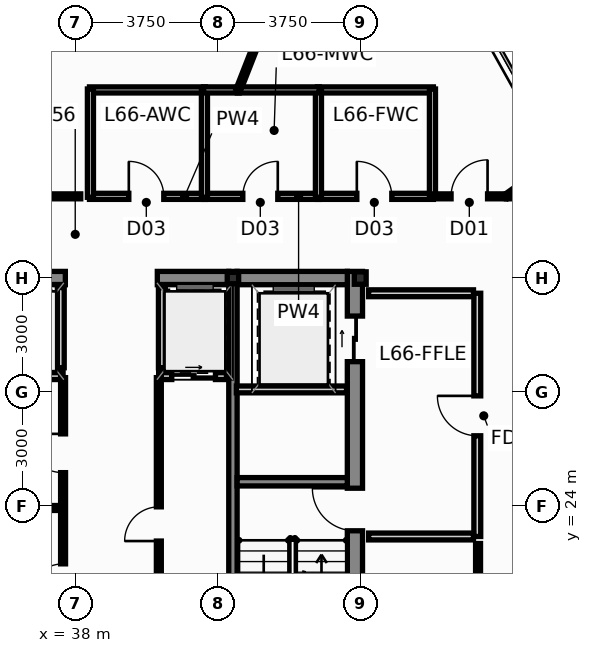
"""IFC4 building model, lengths in metres.
Left out: names, types, materials, properties, quantities, classifications, styles, units other than length and angle.
Written with IfcOpenShell. Run it as: python <this file> out.ifc"""

import sys

from ifc_helpers import new_model, si_unit, direction, frame, frame_2d, origin, origin_2d, place, context, subcontext, project, spatial, rectangle, hollow_rectangle, i_section, extrude, source, transform, mapped, element, fill, save


model = new_model("IFC4")
c1 = context("Model", 3, precision=1e-05, world=origin(), true_north=direction((0.0, 1.0)))
c2 = subcontext(c1, "Body", "Model", "MODEL_VIEW")
j1 = project(units=[si_unit("LENGTHUNIT", "METRE"), si_unit("PLANEANGLEUNIT", "RADIAN")], contexts=[c1])
p1 = place(None, origin())
s1 = spatial("IfcSite", under=j1, at=p1, CompositionType="ELEMENT")
p2 = place(p1, origin())
s2 = spatial("IfcBuilding", under=s1, at=p2, CompositionType="ELEMENT")
p3 = place(p2, frame((0.0, 0.0, 251.75)))
s3 = spatial("IfcBuildingStorey", under=s2, at=p3, CompositionType="ELEMENT", Elevation=251.75)
m1 = source(origin(), c2, "Body", "SweptSolid", [
    extrude(i_section(OverallWidth=0.311, OverallDepth=0.327, WebThickness=0.016, FlangeThickness=0.025, at=origin_2d()), origin(), (0.0, 0.0, 1.0), 3.65),
])
p4 = place(p3, frame((45.5, 30.0, 0.0), z_axis=(0.0, 0.0, 1.0), x_axis=(1.0, 0.0, 0.0)))
e1 = element("IfcColumn", 1, at=p4, inside=s3, PredefinedType="COLUMN", context=c2, shape_type="MappedRepresentation", body=[
    mapped(m1, transform((0.0, 0.0, 0.0), scale=1.0)),
])
m2 = source(origin(), c2, "Body", "SweptSolid", [
    extrude(hollow_rectangle(XDim=0.3, YDim=0.3, WallThickness=0.012, at=origin_2d()), origin(), (0.0, 0.0, 1.0), 3.65),
])
p5 = place(p3, frame((42.15, 30.0, 0.0), z_axis=(0.0, 0.0, 1.0), x_axis=(1.0, 0.0, 0.0)))
e2 = element("IfcColumn", 2, at=p5, inside=s3, PredefinedType="COLUMN", context=c2, shape_type="MappedRepresentation", body=[
    mapped(m2, transform((0.0, 0.0, 0.0), scale=1.0)),
])
p6 = place(p3, frame((45.36, 17.05, 0.0), z_axis=(0.0, 0.0, 1.0), x_axis=(0.0, 1.0, 0.0)))
e3 = element("IfcWall", 3, at=p6, inside=s3, PredefinedType="SHEAR", context=c2, shape_type="SweptSolid", body=[
    extrude(rectangle(XDim=13.125, YDim=0.4, at=frame_2d((6.562, 0.0))), origin(), (0.0, 0.0, 1.0), 3.65),
])
p7 = place(p6, frame((6.3, 0.0, 0.0)))
e4 = element("IfcOpeningElement", 4, at=p7, cuts=e3, PredefinedType="OPENING", context=c2, shape_type="SweptSolid", body=[
    extrude(rectangle(XDim=1.12, YDim=2.15, at=frame_2d((0.56, 1.075))), frame((0.0, 0.212, 0.0), z_axis=(0.0, -1.0, 0.0), x_axis=(1.0, 0.0, 0.0)), (0.0, 0.0, 1.0), 0.424),
])
p8 = place(p6, frame((10.75, 0.0, 0.0)))
e5 = element("IfcOpeningElement", 5, at=p8, cuts=e3, PredefinedType="OPENING", context=c2, shape_type="SweptSolid", body=[
    extrude(rectangle(XDim=1.2, YDim=2.2, at=frame_2d((0.6, 1.1))), frame((0.0, 0.212, 0.0), z_axis=(0.0, -1.0, 0.0), x_axis=(1.0, 0.0, 0.0)), (0.0, 0.0, 1.0), 0.424),
])
p9 = place(p3, frame((33.96, 30.0, 0.0), z_axis=(0.0, 0.0, 1.0), x_axis=(1.0, 0.0, 0.0)))
e6 = element("IfcWall", 6, at=p9, inside=s3, PredefinedType="SHEAR", context=c2, shape_type="SweptSolid", body=[
    extrude(rectangle(XDim=3.78, YDim=0.35, at=frame_2d((1.89, 0.0))), origin(), (0.0, 0.0, 1.0), 3.65),
])
p10 = place(p3, frame((40.16, 30.0, 0.0), z_axis=(0.0, 0.0, 1.0), x_axis=(1.0, 0.0, 0.0)))
e7 = element("IfcWall", 7, at=p10, inside=s3, PredefinedType="SHEAR", context=c2, shape_type="SweptSolid", body=[
    extrude(rectangle(XDim=1.88, YDim=0.35, at=frame_2d((0.94, 0.0))), origin(), (0.0, 0.0, 1.0), 3.65),
])
p11 = place(p3, frame((42.26, 30.0, 0.0), z_axis=(0.0, 0.0, 1.0), x_axis=(1.0, 0.0, 0.0)))
e8 = element("IfcWall", 8, at=p11, inside=s3, PredefinedType="SHEAR", context=c2, shape_type="SweptSolid", body=[
    extrude(rectangle(XDim=2.9, YDim=0.35, at=frame_2d((1.45, 0.0))), origin(), (0.0, 0.0, 1.0), 3.65),
])
p12 = place(p3, frame((42.15, 17.05, 0.0), z_axis=(0.0, 0.0, 1.0), x_axis=(0.0, 1.0, 0.0)))
e9 = element("IfcWall", 9, at=p12, inside=s3, PredefinedType="SHEAR", context=c2, shape_type="SweptSolid", body=[
    extrude(rectangle(XDim=13.125, YDim=0.22, at=frame_2d((6.562, 0.0))), origin(), (0.0, 0.0, 1.0), 3.65),
])
p13 = place(p3, frame((42.26, 24.64, 0.0), z_axis=(0.0, 0.0, 1.0), x_axis=(1.0, 0.0, 0.0)))
e10 = element("IfcWall", 10, at=p13, inside=s3, PredefinedType="SHEAR", context=c2, shape_type="SweptSolid", body=[
    extrude(rectangle(XDim=2.9, YDim=0.22, at=frame_2d((1.45, 0.0))), origin(), (0.0, 0.0, 1.0), 3.65),
])
p14 = place(p3, frame((34.02, 27.42, 0.0), z_axis=(0.0, 0.0, 1.0), x_axis=(1.0, 0.0, 0.0)))
e11 = element("IfcWall", 11, at=p14, inside=s3, PredefinedType="PARTITIONING", context=c2, shape_type="SweptSolid", body=[
    extrude(rectangle(XDim=3.66, YDim=0.18, at=frame_2d((1.83, 0.0))), origin(), (0.0, 0.0, 1.0), 3.4),
])
p15 = place(p14, frame((0.3, 0.0, 0.0)))
e12 = element("IfcOpeningElement", 12, at=p15, cuts=e11, PredefinedType="OPENING", context=c2, shape_type="SweptSolid", body=[
    extrude(rectangle(XDim=1.15, YDim=2.2, at=frame_2d((0.575, 1.1))), frame((0.0, 0.102, 0.0), z_axis=(0.0, -1.0, 0.0), x_axis=(1.0, 0.0, 0.0)), (0.0, 0.0, 1.0), 0.204),
])
p16 = place(p14, frame((2.1, 0.0, 0.0)))
e13 = element("IfcOpeningElement", 13, at=p16, cuts=e11, PredefinedType="OPENING", context=c2, shape_type="SweptSolid", body=[
    extrude(rectangle(XDim=1.15, YDim=2.2, at=frame_2d((0.575, 1.1))), frame((0.0, 0.102, 0.0), z_axis=(0.0, -1.0, 0.0), x_axis=(1.0, 0.0, 0.0)), (0.0, 0.0, 1.0), 0.204),
])
p17 = place(p3, frame((40.22, 27.42, 0.0), z_axis=(0.0, 0.0, 1.0), x_axis=(1.0, 0.0, 0.0)))
e14 = element("IfcWall", 14, at=p17, inside=s3, PredefinedType="PARTITIONING", context=c2, shape_type="SweptSolid", body=[
    extrude(rectangle(XDim=1.76, YDim=0.18, at=frame_2d((0.88, 0.0))), origin(), (0.0, 0.0, 1.0), 3.4),
])
p18 = place(p17, frame((0.32, 0.0, 0.0)))
e15 = element("IfcOpeningElement", 15, at=p18, cuts=e14, PredefinedType="OPENING", context=c2, shape_type="SweptSolid", body=[
    extrude(rectangle(XDim=1.15, YDim=2.2, at=frame_2d((0.575, 1.1))), frame((0.0, 0.102, 0.0), z_axis=(0.0, -1.0, 0.0), x_axis=(1.0, 0.0, 0.0)), (0.0, 0.0, 1.0), 0.204),
])
for number, where, z_axis, x_axis in (
    (16, (37.62, 27.64, 0.0), (0.0, 0.0, 1.0), (0.0, 1.0, 0.0)),
    (17, (40.28, 27.64, 0.0), (0.0, 0.0, 1.0), (0.0, 1.0, 0.0)),
):
    element("IfcWall", number, at=place(p3, frame(where, z_axis=z_axis, x_axis=x_axis)), inside=s3, PredefinedType="PARTITIONING", context=c2, shape_type="SweptSolid", body=[
        extrude(rectangle(XDim=2.11, YDim=0.18, at=frame_2d((1.055, 0.0))), origin(), (0.0, 0.0, 1.0), 3.4),
    ])
p19 = place(p3, frame((48.58, 23.2, 0.0), z_axis=(0.0, 0.0, 1.0), x_axis=(0.0, 1.0, 0.0)))
e18 = element("IfcWall", 18, at=p19, inside=s3, PredefinedType="PARTITIONING", context=c2, shape_type="SweptSolid", body=[
    extrude(rectangle(XDim=6.4, YDim=0.18, at=frame_2d((3.2, 0.0))), origin(), (0.0, 0.0, 1.0), 3.129),
])
p20 = place(p19, frame((2.65, 0.0, 0.0)))
e19 = element("IfcOpeningElement", 19, at=p20, cuts=e18, PredefinedType="OPENING", context=c2, shape_type="SweptSolid", body=[
    extrude(rectangle(XDim=1.05, YDim=2.15, at=frame_2d((0.525, 1.075))), frame((0.0, 0.102, 0.0), z_axis=(0.0, -1.0, 0.0), x_axis=(1.0, 0.0, 0.0)), (0.0, 0.0, 1.0), 0.204),
])
for number, where, z_axis, x_axis in (
    (20, (45.72, 23.2, 0.0), (0.0, 0.0, 1.0), (1.0, 0.0, 0.0)),
    (21, (45.72, 29.6, 0.0), (0.0, 0.0, 1.0), (1.0, 0.0, 0.0)),
):
    element("IfcWall", number, at=place(p3, frame(where, z_axis=z_axis, x_axis=x_axis)), inside=s3, PredefinedType="PARTITIONING", context=c2, shape_type="SweptSolid", body=[
        extrude(rectangle(XDim=2.76, YDim=0.18, at=frame_2d((1.38, 0.0))), origin(), (0.0, 0.0, 1.0), 3.4),
    ])
p21 = place(p3, frame((42.24, 27.07, 0.0), z_axis=(0.0, 0.0, 1.0), x_axis=(1.0, 0.0, 0.0)))
e22 = element("IfcWall", 22, at=p21, inside=s3, PredefinedType="PARTITIONING", context=c2, shape_type="SweptSolid", body=[
    extrude(rectangle(XDim=2.9, YDim=0.18, at=frame_2d((1.45, 0.0))), origin(), (0.0, 0.0, 1.0), 3.4),
])
p22 = place(p3, frame((34.02, 23.95, 0.0), z_axis=(0.0, 0.0, 1.0), x_axis=(1.0, 0.0, 0.0)))
e23 = element("IfcWall", 23, at=p22, inside=s3, PredefinedType="PARTITIONING", context=c2, shape_type="SweptSolid", body=[
    extrude(rectangle(XDim=3.58, YDim=0.13, at=frame_2d((1.79, 0.0))), origin(), (0.0, 0.0, 1.0), 3.4),
])
p23 = place(p3, frame((37.68, 20.48, 0.0), z_axis=(0.0, 0.0, 1.0), x_axis=(0.0, 1.0, 0.0)))
e24 = element("IfcWall", 24, at=p23, inside=s3, PredefinedType="PARTITIONING", context=c2, shape_type="SweptSolid", body=[
    extrude(rectangle(XDim=6.9, YDim=0.13, at=frame_2d((3.45, 0.0))), origin(), (0.0, 0.0, 1.0), 3.4),
])
p24 = place(p23, frame((1.1, 0.0, 0.0)))
e25 = element("IfcOpeningElement", 25, at=p24, cuts=e24, PredefinedType="OPENING", context=c2, shape_type="SweptSolid", body=[
    extrude(rectangle(XDim=0.9, YDim=2.1, at=frame_2d((0.45, 1.05))), frame((0.0, 0.077, 0.0), z_axis=(0.0, -1.0, 0.0), x_axis=(1.0, 0.0, 0.0)), (0.0, 0.0, 1.0), 0.154),
])
p25 = place(p23, frame((4.4, 0.0, 0.0)))
e26 = element("IfcOpeningElement", 26, at=p25, cuts=e24, PredefinedType="OPENING", context=c2, shape_type="SweptSolid", body=[
    extrude(rectangle(XDim=1.02, YDim=2.15, at=frame_2d((0.51, 1.075))), frame((0.0, 0.077, 0.0), z_axis=(0.0, -1.0, 0.0), x_axis=(1.0, 0.0, 0.0)), (0.0, 0.0, 1.0), 0.154),
])
p26 = place(p3, frame((40.2, 20.48, 0.0), z_axis=(0.0, 0.0, 1.0), x_axis=(0.0, 1.0, 0.0)))
e27 = element("IfcWall", 27, at=p26, inside=s3, PredefinedType="PARTITIONING", context=c2, shape_type="SweptSolid", body=[
    extrude(rectangle(XDim=6.9, YDim=0.13, at=frame_2d((3.45, 0.0))), origin(), (0.0, 0.0, 1.0), 3.4),
])
p27 = place(p26, frame((2.6, 0.0, 0.0)))
e28 = element("IfcOpeningElement", 28, at=p27, cuts=e27, PredefinedType="OPENING", context=c2, shape_type="SweptSolid", body=[
    extrude(rectangle(XDim=0.9, YDim=2.1, at=frame_2d((0.45, 1.05))), frame((0.0, 0.077, 0.0), z_axis=(0.0, -1.0, 0.0), x_axis=(1.0, 0.0, 0.0)), (0.0, 0.0, 1.0), 0.154),
])
p28 = place(p3, frame((38.375, 32.15, 0.0), z_axis=(0.0, 0.0, 1.0), x_axis=(1.0, 0.0, 0.0)))
e29 = element("IfcWall", 29, at=p28, inside=s3, PredefinedType="PLUMBINGWALL", context=c2, shape_type="SweptSolid", body=[
    extrude(rectangle(XDim=3.05, YDim=0.16, at=frame_2d((1.525, 0.0))), origin(), (0.0, 0.0, 1.0), 3.4),
])
p29 = place(p28, frame((1.035, 0.0, 0.0)))
e30 = element("IfcOpeningElement", 30, at=p29, cuts=e29, PredefinedType="OPENING", context=c2, shape_type="SweptSolid", body=[
    extrude(rectangle(XDim=0.92, YDim=2.1, at=frame_2d((0.46, 1.05))), frame((0.0, 0.092, 0.0), z_axis=(0.0, -1.0, 0.0), x_axis=(1.0, 0.0, 0.0)), (0.0, 0.0, 1.0), 0.184),
])
p30 = place(p3, frame((41.375, 32.15, 0.0), z_axis=(0.0, 0.0, 1.0), x_axis=(1.0, 0.0, 0.0)))
e31 = element("IfcWall", 31, at=p30, inside=s3, PredefinedType="PLUMBINGWALL", context=c2, shape_type="SweptSolid", body=[
    extrude(rectangle(XDim=3.05, YDim=0.16, at=frame_2d((1.525, 0.0))), origin(), (0.0, 0.0, 1.0), 3.4),
])
p31 = place(p30, frame((1.035, 0.0, 0.0)))
e32 = element("IfcOpeningElement", 32, at=p31, cuts=e31, PredefinedType="OPENING", context=c2, shape_type="SweptSolid", body=[
    extrude(rectangle(XDim=0.92, YDim=2.1, at=frame_2d((0.46, 1.05))), frame((0.0, 0.092, 0.0), z_axis=(0.0, -1.0, 0.0), x_axis=(1.0, 0.0, 0.0)), (0.0, 0.0, 1.0), 0.184),
])
p32 = place(p3, frame((44.375, 32.15, 0.0), z_axis=(0.0, 0.0, 1.0), x_axis=(1.0, 0.0, 0.0)))
e33 = element("IfcWall", 33, at=p32, inside=s3, PredefinedType="PLUMBINGWALL", context=c2, shape_type="SweptSolid", body=[
    extrude(rectangle(XDim=3.05, YDim=0.16, at=frame_2d((1.525, 0.0))), origin(), (0.0, 0.0, 1.0), 3.4),
])
p33 = place(p32, frame((1.035, 0.0, 0.0)))
e34 = element("IfcOpeningElement", 34, at=p33, cuts=e33, PredefinedType="OPENING", context=c2, shape_type="SweptSolid", body=[
    extrude(rectangle(XDim=0.92, YDim=2.1, at=frame_2d((0.46, 1.05))), frame((0.0, 0.092, 0.0), z_axis=(0.0, -1.0, 0.0), x_axis=(1.0, 0.0, 0.0)), (0.0, 0.0, 1.0), 0.184),
])
for number, where, z_axis, x_axis in (
    (35, (38.375, 34.95, 0.0), (0.0, 0.0, 1.0), (1.0, 0.0, 0.0)),
    (36, (47.425, 34.95, 0.0), (0.0, 0.0, 1.0), (-1.0, 0.0, 0.0)),
):
    element("IfcWall", number, at=place(p3, frame(where, z_axis=z_axis, x_axis=x_axis)), inside=s3, PredefinedType="PLUMBINGWALL", context=c2, shape_type="SweptSolid", body=[
        extrude(rectangle(XDim=3.05, YDim=0.16, at=frame_2d((1.525, 0.0))), origin(), (0.0, 0.0, 1.0), 3.4),
    ])
for number, where, z_axis, x_axis in (
    (37, (41.4, 32.125, 0.0), (0.0, 0.0, 1.0), (0.0, 1.0, 0.0)),
    (38, (38.4, 32.125, 0.0), (0.0, 0.0, 1.0), (0.0, 1.0, 0.0)),
):
    element("IfcWall", number, at=place(p3, frame(where, z_axis=z_axis, x_axis=x_axis)), inside=s3, PredefinedType="PLUMBINGWALL", context=c2, shape_type="SweptSolid", body=[
        extrude(rectangle(XDim=2.85, YDim=0.16, at=frame_2d((1.425, 0.0))), origin(), (0.0, 0.0, 1.0), 3.4),
    ])
for number, where, z_axis, x_axis in (
    (39, (44.4, 32.125, 0.0), (0.0, 0.0, 1.0), (0.0, 1.0, 0.0)),
    (40, (47.4, 32.125, 0.0), (0.0, 0.0, 1.0), (0.0, 1.0, 0.0)),
):
    element("IfcWall", number, at=place(p3, frame(where, z_axis=z_axis, x_axis=x_axis)), inside=s3, PredefinedType="PLUMBINGWALL", context=c2, shape_type="SweptSolid", body=[
        extrude(rectangle(XDim=2.85, YDim=0.16, at=frame_2d((1.425, 0.0))), origin(), (0.0, 0.0, 1.0), 2.985),
    ])
p34 = place(p3, frame((42.265, 34.95, 0.0), z_axis=(0.0, 0.0, 1.0), x_axis=(1.0, 0.0, 0.0)))
e41 = element("IfcWall", 41, at=p34, inside=s3, PredefinedType="PLUMBINGWALL", context=c2, shape_type="SweptSolid", body=[
    extrude(rectangle(XDim=2.16, YDim=0.16, at=frame_2d((1.08, 0.0))), origin(), (0.0, 0.0, 1.0), 3.4),
])
p35 = place(p3, frame((41.375, 34.95, 0.0), z_axis=(0.0, 0.0, 1.0), x_axis=(1.0, 0.0, 0.0)))
e42 = element("IfcWall", 42, at=p35, inside=s3, PredefinedType="PLUMBINGWALL", context=c2, shape_type="SweptSolid", body=[
    extrude(rectangle(XDim=0.94, YDim=0.16, at=frame_2d((0.47, 0.0))), origin(), (0.0, 0.0, 1.0), 3.4),
])
p36 = place(p3, frame((42.292, 34.955, 0.0), z_axis=(0.0, 0.0, 1.0), x_axis=(0.364837911117, 0.931071049175, 0.0)))
e43 = element("IfcWall", 43, at=p36, inside=s3, PredefinedType="PARTITIONING", context=c2, shape_type="SweptSolid", body=[
    extrude(rectangle(XDim=8.311, YDim=0.13, at=frame_2d((4.156, 0.0))), origin(), (0.0, 0.0, 1.0), 3.4),
])
p37 = place(p36, frame((3.676, 0.0, 0.0)))
e44 = element("IfcOpeningElement", 44, at=p37, cuts=e43, PredefinedType="OPENING", context=c2, shape_type="SweptSolid", body=[
    extrude(rectangle(XDim=0.96, YDim=2.15, at=frame_2d((0.48, 1.075))), frame((0.0, 0.077, 0.0), z_axis=(0.0, -1.0, 0.0), x_axis=(1.0, 0.0, 0.0)), (0.0, 0.0, 1.0), 0.154),
])
p38 = place(p3, frame((31.605, 32.15, 0.0), z_axis=(0.0, 0.0, 1.0), x_axis=(1.0, 0.0, 0.0)))
e45 = element("IfcWall", 45, at=p38, inside=s3, PredefinedType="PARTITIONING", context=c2, shape_type="SweptSolid", body=[
    extrude(rectangle(XDim=6.54, YDim=0.13, at=frame_2d((3.27, 0.0))), origin(), (0.0, 0.0, 1.0), 3.4),
])
p39 = place(p38, frame((2.79, 0.0, 0.0)))
e46 = element("IfcOpeningElement", 46, at=p39, cuts=e45, PredefinedType="OPENING", context=c2, shape_type="SweptSolid", body=[
    extrude(rectangle(XDim=0.96, YDim=2.15, at=frame_2d((0.48, 1.075))), frame((0.0, 0.077, 0.0), z_axis=(0.0, -1.0, 0.0), x_axis=(1.0, 0.0, 0.0)), (0.0, 0.0, 1.0), 0.154),
])
p40 = place(p3, frame((48.6, 17.105, 0.0), z_axis=(0.0, 0.0, 1.0), x_axis=(0.0, 1.0, 0.0)))
e47 = element("IfcWall", 47, at=p40, inside=s3, PredefinedType="PARTITIONING", context=c2, shape_type="SweptSolid", body=[
    extrude(rectangle(XDim=5.91, YDim=0.13, at=frame_2d((2.955, 0.0))), origin(), (0.0, 0.0, 1.0), 3.4),
])
p41 = place(p40, frame((2.475, 0.0, 0.0)))
e48 = element("IfcOpeningElement", 48, at=p41, cuts=e47, PredefinedType="OPENING", context=c2, shape_type="SweptSolid", body=[
    extrude(rectangle(XDim=0.96, YDim=2.15, at=frame_2d((0.48, 1.075))), frame((0.0, 0.077, 0.0), z_axis=(0.0, -1.0, 0.0), x_axis=(1.0, 0.0, 0.0)), (0.0, 0.0, 1.0), 0.154),
])
p42 = place(p3, frame((47.405, 32.15, 0.0), z_axis=(0.0, 0.0, 1.0), x_axis=(1.0, 0.0, 0.0)))
e49 = element("IfcWall", 49, at=p42, inside=s3, PredefinedType="PARTITIONING", context=c2, shape_type="SweptSolid", body=[
    extrude(rectangle(XDim=1.93, YDim=0.13, at=frame_2d((0.965, 0.0))), origin(), (0.0, 0.0, 1.0), 3.4),
])
p43 = place(p42, frame((0.485, 0.0, 0.0)))
e50 = element("IfcOpeningElement", 50, at=p43, cuts=e49, PredefinedType="OPENING", context=c2, shape_type="SweptSolid", body=[
    extrude(rectangle(XDim=0.96, YDim=2.15, at=frame_2d((0.48, 1.075))), frame((0.0, 0.077, 0.0), z_axis=(0.0, -1.0, 0.0), x_axis=(1.0, 0.0, 0.0)), (0.0, 0.0, 1.0), 0.154),
])
p44 = place(p3, frame((49.344, 32.153, 0.0), z_axis=(0.0, 0.0, 1.0), x_axis=(0.812257035701, 0.583299672514, 0.0)))
e51 = element("IfcWall", 51, at=p44, inside=s3, PredefinedType="PARTITIONING", context=c2, shape_type="SweptSolid", body=[
    extrude(rectangle(XDim=1.645, YDim=0.13, at=frame_2d((0.823, 0.0))), origin(), (0.0, 0.0, 1.0), 3.4),
])
p45 = place(p3, frame((51.193, 32.15, 0.0), z_axis=(0.0, 0.0, 1.0), x_axis=(-1.0, 0.0, 0.0)))
e52 = element("IfcWall", 52, at=p45, inside=s3, PredefinedType="PARTITIONING", context=c2, shape_type="SweptSolid", body=[
    extrude(rectangle(XDim=1.848, YDim=0.13, at=frame_2d((0.924, 0.0))), origin(), (0.0, 0.0, 1.0), 3.4),
])
p46 = place(p7, origin())
e53 = element("IfcDoor", 53, at=p46, inside=s3, OperationType="SINGLE_SWING_RIGHT", PredefinedType="DOOR", context=c2, shape_type="SweptSolid", body=[
    extrude(rectangle(XDim=1.12, YDim=2.15, at=frame_2d((0.56, 1.075))), frame((0.0, 0.025, 0.0), z_axis=(0.0, -1.0, 0.0), x_axis=(1.0, 0.0, 0.0)), (0.0, 0.0, 1.0), 0.05),
])
fill(e4, e53)
p47 = place(p8, origin())
e54 = element("IfcDoor", 54, at=p47, inside=s3, OperationType="SLIDING_TO_RIGHT", PredefinedType="DOOR", context=c2, shape_type="SweptSolid", body=[
    extrude(rectangle(XDim=1.2, YDim=2.2, at=frame_2d((0.6, 1.1))), frame((0.0, 0.025, 0.0), z_axis=(0.0, -1.0, 0.0), x_axis=(1.0, 0.0, 0.0)), (0.0, 0.0, 1.0), 0.05),
])
fill(e5, e54)
p48 = place(p18, origin())
e55 = element("IfcDoor", 55, at=p48, inside=s3, OperationType="SLIDING_TO_RIGHT", PredefinedType="DOOR", context=c2, shape_type="SweptSolid", body=[
    extrude(rectangle(XDim=1.15, YDim=2.2, at=frame_2d((0.575, 1.1))), frame((0.0, 0.025, 0.0), z_axis=(0.0, -1.0, 0.0), x_axis=(1.0, 0.0, 0.0)), (0.0, 0.0, 1.0), 0.05),
])
fill(e15, e55)
p49 = place(p20, origin())
e56 = element("IfcDoor", 56, at=p49, inside=s3, OperationType="SINGLE_SWING_RIGHT", PredefinedType="DOOR", context=c2, shape_type="SweptSolid", body=[
    extrude(rectangle(XDim=1.05, YDim=2.15, at=frame_2d((0.525, 1.075))), frame((0.0, 0.025, 0.0), z_axis=(0.0, -1.0, 0.0), x_axis=(1.0, 0.0, 0.0)), (0.0, 0.0, 1.0), 0.05),
])
fill(e19, e56)
p50 = place(p24, origin())
e57 = element("IfcDoor", 57, at=p50, inside=s3, OperationType="SINGLE_SWING_LEFT", PredefinedType="DOOR", context=c2, shape_type="SweptSolid", body=[
    extrude(rectangle(XDim=0.9, YDim=2.1, at=frame_2d((0.45, 1.05))), frame((0.0, 0.025, 0.0), z_axis=(0.0, -1.0, 0.0), x_axis=(1.0, 0.0, 0.0)), (0.0, 0.0, 1.0), 0.05),
])
fill(e25, e57)
p51 = place(p25, origin())
e58 = element("IfcDoor", 58, at=p51, inside=s3, OperationType="SINGLE_SWING_RIGHT", PredefinedType="DOOR", context=c2, shape_type="SweptSolid", body=[
    extrude(rectangle(XDim=1.02, YDim=2.15, at=frame_2d((0.51, 1.075))), frame((0.0, 0.025, 0.0), z_axis=(0.0, -1.0, 0.0), x_axis=(1.0, 0.0, 0.0)), (0.0, 0.0, 1.0), 0.05),
])
fill(e26, e58)
p52 = place(p27, origin())
e59 = element("IfcDoor", 59, at=p52, inside=s3, OperationType="SINGLE_SWING_LEFT", PredefinedType="DOOR", context=c2, shape_type="SweptSolid", body=[
    extrude(rectangle(XDim=0.9, YDim=2.1, at=frame_2d((0.45, 1.05))), frame((0.0, 0.025, 0.0), z_axis=(0.0, -1.0, 0.0), x_axis=(1.0, 0.0, 0.0)), (0.0, 0.0, 1.0), 0.05),
])
fill(e28, e59)
p53 = place(p29, origin())
e60 = element("IfcDoor", 60, at=p53, inside=s3, OperationType="SINGLE_SWING_LEFT", PredefinedType="DOOR", context=c2, shape_type="SweptSolid", body=[
    extrude(rectangle(XDim=0.92, YDim=2.1, at=frame_2d((0.46, 1.05))), frame((0.0, 0.025, 0.0), z_axis=(0.0, -1.0, 0.0), x_axis=(1.0, 0.0, 0.0)), (0.0, 0.0, 1.0), 0.05),
])
fill(e30, e60)
p54 = place(p31, origin())
e61 = element("IfcDoor", 61, at=p54, inside=s3, OperationType="SINGLE_SWING_RIGHT", PredefinedType="DOOR", context=c2, shape_type="SweptSolid", body=[
    extrude(rectangle(XDim=0.92, YDim=2.1, at=frame_2d((0.46, 1.05))), frame((0.0, 0.025, 0.0), z_axis=(0.0, -1.0, 0.0), x_axis=(1.0, 0.0, 0.0)), (0.0, 0.0, 1.0), 0.05),
])
fill(e32, e61)
p55 = place(p33, origin())
e62 = element("IfcDoor", 62, at=p55, inside=s3, OperationType="SINGLE_SWING_LEFT", PredefinedType="DOOR", context=c2, shape_type="SweptSolid", body=[
    extrude(rectangle(XDim=0.92, YDim=2.1, at=frame_2d((0.46, 1.05))), frame((0.0, 0.025, 0.0), z_axis=(0.0, -1.0, 0.0), x_axis=(1.0, 0.0, 0.0)), (0.0, 0.0, 1.0), 0.05),
])
fill(e34, e62)
p56 = place(p43, origin())
e63 = element("IfcDoor", 63, at=p56, inside=s3, OperationType="SINGLE_SWING_RIGHT", PredefinedType="DOOR", context=c2, shape_type="SweptSolid", body=[
    extrude(rectangle(XDim=0.96, YDim=2.15, at=frame_2d((0.48, 1.075))), frame((0.0, 0.025, 0.0), z_axis=(0.0, -1.0, 0.0), x_axis=(1.0, 0.0, 0.0)), (0.0, 0.0, 1.0), 0.05),
])
fill(e50, e63)
save(model, sys.argv[1])
